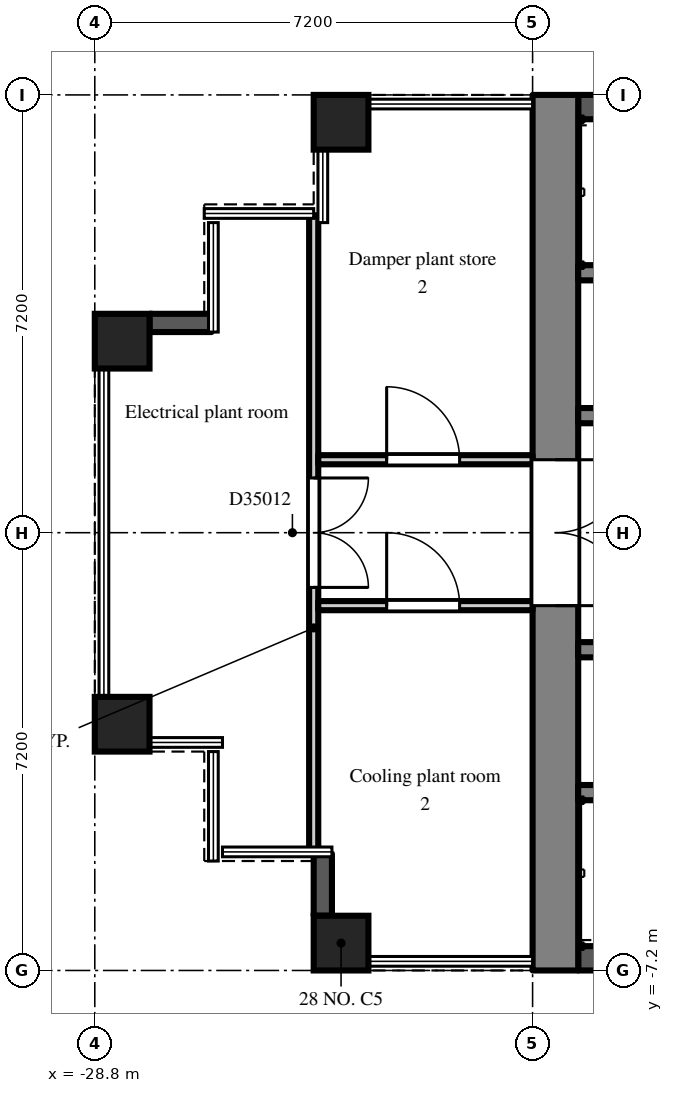
"""IFC4 building model, lengths in metres.
Left out: names, types, materials, properties, quantities, classifications, styles, units other than length and angle.
Written with IfcOpenShell. Run it as: python <this file> out.ifc"""

import sys

from ifc_helpers import new_model, si_unit, direction, frame, frame_2d, origin, origin_2d, place, context, subcontext, project, spatial, rectangle, extrude, element, fill, save


model = new_model("IFC4")
c1 = context("Model", 3, precision=1e-05, world=origin(), true_north=direction((0.0, 1.0)))
c2 = subcontext(c1, "Body", "Model", "MODEL_VIEW")
j1 = project(units=[si_unit("LENGTHUNIT", "METRE"), si_unit("PLANEANGLEUNIT", "RADIAN")], contexts=[c1])
p1 = place(None, origin())
s1 = spatial("IfcSite", under=j1, at=p1, CompositionType="ELEMENT")
p2 = place(p1, origin())
s2 = spatial("IfcBuilding", under=s1, at=p2, CompositionType="ELEMENT")
p3 = place(p2, frame((0.0, 0.0, 242.1)))
s3 = spatial("IfcBuildingStorey", under=s2, at=p3, CompositionType="ELEMENT", Elevation=242.1)
for number, where, z_axis, x_axis in (
    (1, (-28.35, -3.15, 0.0), (0.0, 0.0, 1.0), (1.0, 0.0, 0.0)),
    (2, (-28.35, 3.15, 0.0), (0.0, 0.0, 1.0), (1.0, 0.0, 0.0)),
    (3, (-24.75, -6.75, 0.0), (0.0, 0.0, 1.0), (1.0, 0.0, 0.0)),
    (4, (-24.75, 6.75, 0.0), (0.0, 0.0, 1.0), (1.0, 0.0, 0.0)),
):
    element("IfcColumn", number, at=place(p3, frame(where, z_axis=z_axis, x_axis=x_axis)), inside=s3, PredefinedType="COLUMN", context=c2, shape_type="SweptSolid", body=[
        extrude(rectangle(XDim=0.9, YDim=0.9, at=origin_2d()), origin(), (0.0, 0.0, 1.0), 5.4),
    ])
for number, where, z_axis, x_axis in (
    (5, (-26.88, 3.45, 0.0), (0.0, 0.0, 1.0), (-1.0, 0.0, 0.0)),
    (6, (-25.05, -5.28, 0.0), (0.0, 0.0, 1.0), (0.0, -1.0, 0.0)),
):
    element("IfcWall", number, at=place(p3, frame(where, z_axis=z_axis, x_axis=x_axis)), inside=s3, PredefinedType="SOLIDWALL", context=c2, shape_type="SweptSolid", body=[
        extrude(rectangle(XDim=1.02, YDim=0.3, at=frame_2d((0.51, 0.0))), origin(), (0.0, 0.0, 1.0), 4.95),
    ])
p4 = place(p3, frame((-21.225, -7.2, 0.0), z_axis=(0.0, 0.0, 1.0), x_axis=(0.0, 1.0, 0.0)))
e7 = element("IfcWall", 7, at=p4, inside=s3, PredefinedType="SHEAR", context=c2, shape_type="SweptSolid", body=[
    extrude(rectangle(XDim=14.4, YDim=0.75, at=frame_2d((7.2, 0.0))), origin(), (0.0, 0.0, 1.0), 4.95),
])
p5 = place(p4, frame((6.0, 0.0, 0.0)))
e8 = element("IfcOpeningElement", 8, at=p5, cuts=e7, PredefinedType="OPENING", context=c2, shape_type="SweptSolid", body=[
    extrude(rectangle(XDim=2.4, YDim=2.2, at=frame_2d((1.2, 1.1))), frame((0.0, 0.385, 0.0), z_axis=(0.0, -1.0, 0.0), x_axis=(1.0, 0.0, 0.0)), (0.0, 0.0, 1.0), 0.77),
])
p6 = place(p3, frame((-7.9, 7.0, 0.0), z_axis=(0.0, 0.0, 1.0), x_axis=(-1.0, 0.0, 0.0)))
e9 = element("IfcWall", 9, at=p6, inside=s3, PredefinedType="SHEAR", context=c2, shape_type="SweptSolid", body=[
    extrude(rectangle(XDim=12.95, YDim=0.4, at=frame_2d((6.475, 0.0))), origin(), (0.0, 0.0, 1.0), 4.95),
])
p7 = place(p3, frame((-7.9, 1.925, 0.0), z_axis=(0.0, 0.0, 1.0), x_axis=(-1.0, 0.0, 0.0)))
e10 = element("IfcWall", 10, at=p7, inside=s3, PredefinedType="SHEAR", context=c2, shape_type="SweptSolid", body=[
    extrude(rectangle(XDim=12.95, YDim=0.25, at=frame_2d((6.475, 0.0))), origin(), (0.0, 0.0, 1.0), 4.95),
])
p8 = place(p7, frame((0.525, 0.0, 0.0)))
e11 = element("IfcOpeningElement", 11, at=p8, cuts=e10, PredefinedType="OPENING", context=c2, shape_type="SweptSolid", body=[
    extrude(rectangle(XDim=0.9, YDim=2.1, at=frame_2d((0.45, 1.05))), frame((0.0, 0.135, 0.0), z_axis=(0.0, -1.0, 0.0), x_axis=(1.0, 0.0, 0.0)), (0.0, 0.0, 1.0), 0.27),
])
p9 = place(p7, frame((2.625, 0.0, 0.0)))
e12 = element("IfcOpeningElement", 12, at=p9, cuts=e10, PredefinedType="OPENING", context=c2, shape_type="SweptSolid", body=[
    extrude(rectangle(XDim=1.1, YDim=2.1, at=frame_2d((0.55, 1.05))), frame((0.0, 0.135, 0.0), z_axis=(0.0, -1.0, 0.0), x_axis=(1.0, 0.0, 0.0)), (0.0, 0.0, 1.0), 0.27),
])
p10 = place(p7, frame((11.525, 0.0, 0.0)))
e13 = element("IfcOpeningElement", 13, at=p10, cuts=e10, PredefinedType="OPENING", context=c2, shape_type="SweptSolid", body=[
    extrude(rectangle(XDim=0.9, YDim=2.1, at=frame_2d((0.45, 1.05))), frame((0.0, 0.135, 0.0), z_axis=(0.0, -1.0, 0.0), x_axis=(1.0, 0.0, 0.0)), (0.0, 0.0, 1.0), 0.27),
])
p11 = place(p3, frame((-12.3, 4.275, 0.0), z_axis=(0.0, 0.0, 1.0), x_axis=(-1.0, 0.0, 0.0)))
e14 = element("IfcWall", 14, at=p11, inside=s3, PredefinedType="SHEAR", context=c2, shape_type="SweptSolid", body=[
    extrude(rectangle(XDim=8.55, YDim=0.25, at=frame_2d((4.275, 0.0))), origin(), (0.0, 0.0, 1.0), 4.95),
])
p12 = place(p3, frame((-7.9, -7.0, 0.0), z_axis=(0.0, 0.0, 1.0), x_axis=(-1.0, 0.0, 0.0)))
e15 = element("IfcWall", 15, at=p12, inside=s3, PredefinedType="SHEAR", context=c2, shape_type="SweptSolid", body=[
    extrude(rectangle(XDim=12.95, YDim=0.4, at=frame_2d((6.475, 0.0))), origin(), (0.0, 0.0, 1.0), 4.95),
])
p13 = place(p3, frame((-7.9, -1.925, 0.0), z_axis=(0.0, 0.0, 1.0), x_axis=(-1.0, 0.0, 0.0)))
e16 = element("IfcWall", 16, at=p13, inside=s3, PredefinedType="SHEAR", context=c2, shape_type="SweptSolid", body=[
    extrude(rectangle(XDim=12.95, YDim=0.25, at=frame_2d((6.475, 0.0))), origin(), (0.0, 0.0, 1.0), 4.95),
])
p14 = place(p13, frame((0.525, 0.0, 0.0)))
e17 = element("IfcOpeningElement", 17, at=p14, cuts=e16, PredefinedType="OPENING", context=c2, shape_type="SweptSolid", body=[
    extrude(rectangle(XDim=0.9, YDim=2.1, at=frame_2d((0.45, 1.05))), frame((0.0, 0.135, 0.0), z_axis=(0.0, -1.0, 0.0), x_axis=(1.0, 0.0, 0.0)), (0.0, 0.0, 1.0), 0.27),
])
p15 = place(p13, frame((2.625, 0.0, 0.0)))
e18 = element("IfcOpeningElement", 18, at=p15, cuts=e16, PredefinedType="OPENING", context=c2, shape_type="SweptSolid", body=[
    extrude(rectangle(XDim=1.1, YDim=2.1, at=frame_2d((0.55, 1.05))), frame((0.0, 0.135, 0.0), z_axis=(0.0, -1.0, 0.0), x_axis=(1.0, 0.0, 0.0)), (0.0, 0.0, 1.0), 0.27),
])
p16 = place(p13, frame((6.025, 0.0, 0.0)))
e19 = element("IfcOpeningElement", 19, at=p16, cuts=e16, PredefinedType="OPENING", context=c2, shape_type="SweptSolid", body=[
    extrude(rectangle(XDim=0.9, YDim=2.1, at=frame_2d((0.45, 1.05))), frame((0.0, 0.135, 0.0), z_axis=(0.0, -1.0, 0.0), x_axis=(1.0, 0.0, 0.0)), (0.0, 0.0, 1.0), 0.27),
])
p17 = place(p13, frame((10.425, 0.0, 0.0)))
e20 = element("IfcOpeningElement", 20, at=p17, cuts=e16, PredefinedType="OPENING", context=c2, shape_type="SweptSolid", body=[
    extrude(rectangle(XDim=0.9, YDim=2.1, at=frame_2d((0.45, 1.05))), frame((0.0, 0.135, 0.0), z_axis=(0.0, -1.0, 0.0), x_axis=(1.0, 0.0, 0.0)), (0.0, 0.0, 1.0), 0.27),
])
p18 = place(p3, frame((-12.3, -4.275, 0.0), z_axis=(0.0, 0.0, 1.0), x_axis=(-1.0, 0.0, 0.0)))
e21 = element("IfcWall", 21, at=p18, inside=s3, PredefinedType="SHEAR", context=c2, shape_type="SweptSolid", body=[
    extrude(rectangle(XDim=8.55, YDim=0.25, at=frame_2d((4.275, 0.0))), origin(), (0.0, 0.0, 1.0), 4.95),
])
p19 = place(p3, frame((-25.2, -5.22, 0.0), z_axis=(0.0, 0.0, 1.0), x_axis=(0.0, 1.0, 0.0)))
e22 = element("IfcWall", 22, at=p19, inside=s3, PredefinedType="PARTITIONING", context=c2, shape_type="SweptSolid", body=[
    extrude(rectangle(XDim=10.44, YDim=0.15, at=frame_2d((5.22, 0.0))), origin(), (0.0, 0.0, 1.0), 4.95),
])
p20 = place(p19, frame((4.32, 0.0, 0.0)))
e23 = element("IfcOpeningElement", 23, at=p20, cuts=e22, PredefinedType="OPENING", context=c2, shape_type="SweptSolid", body=[
    extrude(rectangle(XDim=1.8, YDim=2.1, at=frame_2d((0.9, 1.05))), frame((0.0, 0.085, 0.0), z_axis=(0.0, -1.0, 0.0), x_axis=(1.0, 0.0, 0.0)), (0.0, 0.0, 1.0), 0.17),
])
p21 = place(p3, frame((-25.125, -1.2, 0.0), z_axis=(0.0, 0.0, 1.0), x_axis=(1.0, 0.0, 0.0)))
e24 = element("IfcWall", 24, at=p21, inside=s3, PredefinedType="PARTITIONING", context=c2, shape_type="SweptSolid", body=[
    extrude(rectangle(XDim=3.525, YDim=0.15, at=frame_2d((1.762, 0.0))), origin(), (0.0, 0.0, 1.0), 4.95),
])
p22 = place(p21, frame((1.125, 0.0, 0.0)))
e25 = element("IfcOpeningElement", 25, at=p22, cuts=e24, PredefinedType="OPENING", context=c2, shape_type="SweptSolid", body=[
    extrude(rectangle(XDim=1.2, YDim=2.1, at=frame_2d((0.6, 1.05))), frame((0.0, 0.085, 0.0), z_axis=(0.0, -1.0, 0.0), x_axis=(1.0, 0.0, 0.0)), (0.0, 0.0, 1.0), 0.17),
])
p23 = place(p3, frame((-25.125, 1.2, 0.0), z_axis=(0.0, 0.0, 1.0), x_axis=(1.0, 0.0, 0.0)))
e26 = element("IfcWall", 26, at=p23, inside=s3, PredefinedType="PARTITIONING", context=c2, shape_type="SweptSolid", body=[
    extrude(rectangle(XDim=3.525, YDim=0.15, at=frame_2d((1.762, 0.0))), origin(), (0.0, 0.0, 1.0), 4.95),
])
p24 = place(p23, frame((1.125, 0.0, 0.0)))
e27 = element("IfcOpeningElement", 27, at=p24, cuts=e26, PredefinedType="OPENING", context=c2, shape_type="SweptSolid", body=[
    extrude(rectangle(XDim=1.2, YDim=2.1, at=frame_2d((0.6, 1.05))), frame((0.0, 0.085, 0.0), z_axis=(0.0, -1.0, 0.0), x_axis=(1.0, 0.0, 0.0)), (0.0, 0.0, 1.0), 0.17),
])
p25 = place(p5, frame((2.4, 0.0, 0.0), z_axis=(0.0, 0.0, 1.0), x_axis=(-1.0, 0.0, 0.0)))
e28 = element("IfcDoor", 28, at=p25, inside=s3, OperationType="DOUBLE_DOOR_DOUBLE_SWING", PredefinedType="DOOR", context=c2, shape_type="SweptSolid", body=[
    extrude(rectangle(XDim=2.4, YDim=2.2, at=frame_2d((1.2, 1.1))), frame((0.0, 0.025, 0.0), z_axis=(0.0, -1.0, 0.0), x_axis=(1.0, 0.0, 0.0)), (0.0, 0.0, 1.0), 0.05),
])
fill(e8, e28)
p26 = place(p20, frame((1.8, 0.0, 0.0), z_axis=(0.0, 0.0, 1.0), x_axis=(-1.0, 0.0, 0.0)))
e29 = element("IfcDoor", 29, at=p26, inside=s3, OperationType="DOUBLE_DOOR_DOUBLE_SWING", PredefinedType="DOOR", context=c2, shape_type="SweptSolid", body=[
    extrude(rectangle(XDim=1.8, YDim=2.1, at=frame_2d((0.9, 1.05))), frame((0.0, 0.025, 0.0), z_axis=(0.0, -1.0, 0.0), x_axis=(1.0, 0.0, 0.0)), (0.0, 0.0, 1.0), 0.05),
])
fill(e23, e29)
p27 = place(p22, origin())
e30 = element("IfcDoor", 30, at=p27, inside=s3, OperationType="SINGLE_SWING_LEFT", PredefinedType="DOOR", context=c2, shape_type="SweptSolid", body=[
    extrude(rectangle(XDim=1.2, YDim=2.1, at=frame_2d((0.6, 1.05))), frame((0.0, 0.025, 0.0), z_axis=(0.0, -1.0, 0.0), x_axis=(1.0, 0.0, 0.0)), (0.0, 0.0, 1.0), 0.05),
])
fill(e25, e30)
p28 = place(p24, origin())
e31 = element("IfcDoor", 31, at=p28, inside=s3, OperationType="SINGLE_SWING_LEFT", PredefinedType="DOOR", context=c2, shape_type="SweptSolid", body=[
    extrude(rectangle(XDim=1.2, YDim=2.1, at=frame_2d((0.6, 1.05))), frame((0.0, 0.025, 0.0), z_axis=(0.0, -1.0, 0.0), x_axis=(1.0, 0.0, 0.0)), (0.0, 0.0, 1.0), 0.05),
])
fill(e27, e31)
save(model, sys.argv[1])
